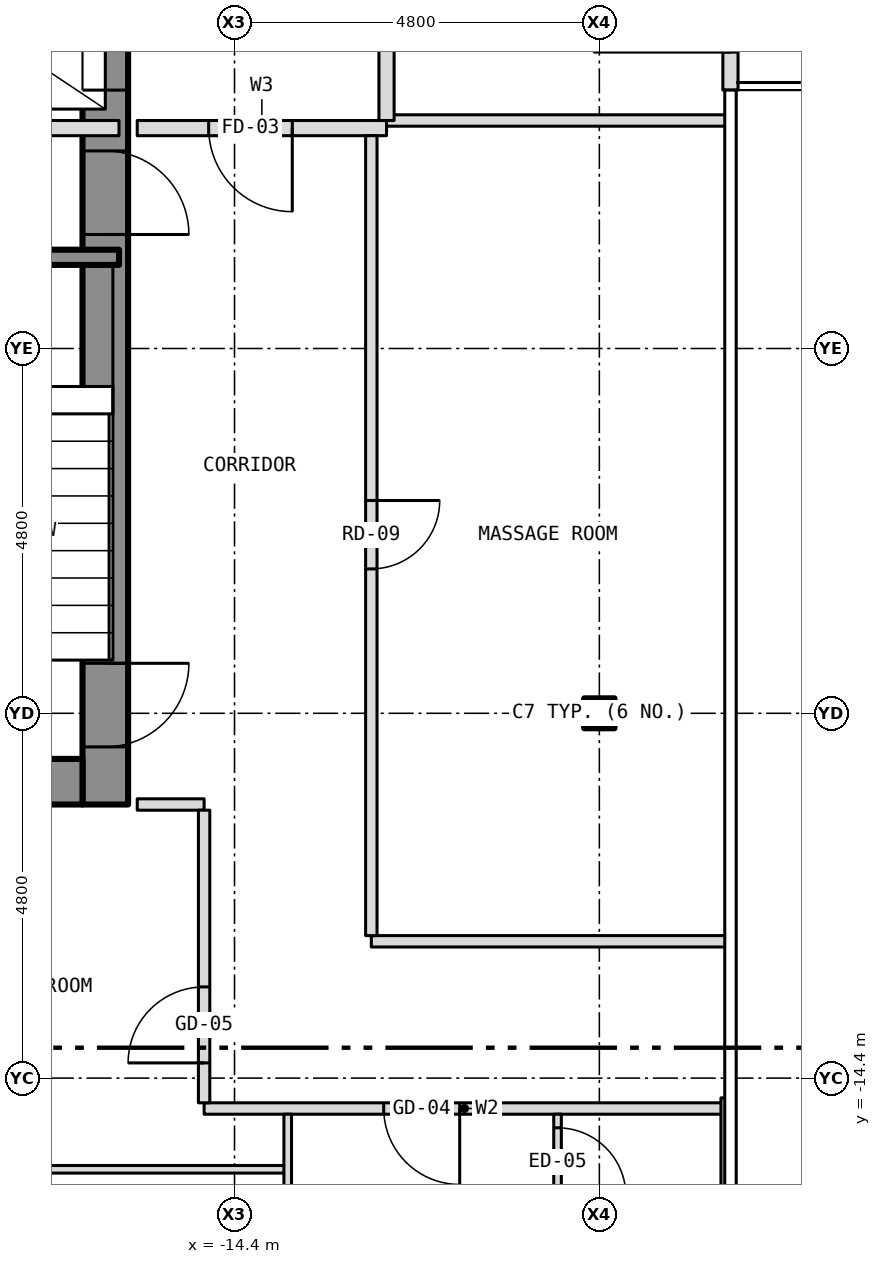
"""IFC4 building model, lengths in metres.
Left out: names, types, materials, properties, quantities, classifications, styles, units other than length and angle.
Written with IfcOpenShell. Run it as: python <this file> out.ifc"""

import sys

from ifc_helpers import new_model, si_unit, direction, frame, frame_2d, origin, origin_2d, place, context, subcontext, project, spatial, rectangle, i_section, extrude, element, fill, save


model = new_model("IFC4")
c1 = context("Model", 3, precision=1e-05, world=origin(), true_north=direction((0.0, 1.0)))
c2 = subcontext(c1, "Body", "Model", "MODEL_VIEW")
j1 = project(units=[si_unit("LENGTHUNIT", "METRE"), si_unit("PLANEANGLEUNIT", "RADIAN")], contexts=[c1])
p1 = place(None, origin())
s1 = spatial("IfcSite", under=j1, at=p1, CompositionType="ELEMENT")
p2 = place(p1, origin())
s2 = spatial("IfcBuilding", under=s1, at=p2, CompositionType="ELEMENT")
p3 = place(p2, frame((0.0, 0.0, 120.5)))
s3 = spatial("IfcBuildingStorey", under=s2, at=p3, CompositionType="ELEMENT", Elevation=120.5)
p4 = place(p3, frame((-9.6, -9.6, -0.15), z_axis=(0.0, 0.0, 1.0), x_axis=(1.0, 0.0, 0.0)))
e1 = element("IfcColumn", 1, at=p4, inside=s3, PredefinedType="COLUMN", context=c2, shape_type="SweptSolid", body=[
    extrude(i_section(OverallWidth=0.399, OverallDepth=0.394, WebThickness=0.023, FlangeThickness=0.037, at=origin_2d()), origin(), (0.0, 0.0, 1.0), 3.5),
])
p5 = place(p3, frame((-16.1, -10.8, 0.0), z_axis=(0.0, 0.0, 1.0), x_axis=(0.0, 1.0, 0.0)))
e2 = element("IfcWall", 2, at=p5, inside=s3, PredefinedType="SHEAR", context=c2, shape_type="SweptSolid", body=[
    extrude(rectangle(XDim=21.6, YDim=0.6, at=frame_2d((10.8, 0.0))), origin(), (0.0, 0.0, 1.0), 3.25),
])
p6 = place(p5, frame((9.4, 0.0, 0.0)))
e3 = element("IfcOpeningElement", 3, at=p6, cuts=e2, PredefinedType="OPENING", context=c2, shape_type="SweptSolid", body=[
    extrude(rectangle(XDim=1.1, YDim=2.1, at=frame_2d((0.55, 1.05))), frame((0.0, 0.312, 0.0), z_axis=(0.0, -1.0, 0.0), x_axis=(1.0, 0.0, 0.0)), (0.0, 0.0, 1.0), 0.624),
])
p7 = place(p5, frame((11.5, 0.0, 0.0)))
e4 = element("IfcOpeningElement", 4, at=p7, cuts=e2, PredefinedType="OPENING", context=c2, shape_type="SweptSolid", body=[
    extrude(rectangle(XDim=1.1, YDim=2.1, at=frame_2d((0.55, 1.05))), frame((0.0, 0.312, 0.0), z_axis=(0.0, -1.0, 0.0), x_axis=(1.0, 0.0, 0.0)), (0.0, 0.0, 1.0), 0.624),
])
p8 = place(p5, frame((13.6, 0.0, 0.0)))
e5 = element("IfcOpeningElement", 5, at=p8, cuts=e2, PredefinedType="OPENING", context=c2, shape_type="SweptSolid", body=[
    extrude(rectangle(XDim=1.1, YDim=2.1, at=frame_2d((0.55, 1.05))), frame((0.0, 0.312, 0.0), z_axis=(0.0, -1.0, 0.0), x_axis=(1.0, 0.0, 0.0)), (0.0, 0.0, 1.0), 0.624),
])
p9 = place(p5, frame((15.7, 0.0, 0.0)))
e6 = element("IfcOpeningElement", 6, at=p9, cuts=e2, PredefinedType="OPENING", context=c2, shape_type="SweptSolid", body=[
    extrude(rectangle(XDim=1.1, YDim=2.1, at=frame_2d((0.55, 1.05))), frame((0.0, 0.312, 0.0), z_axis=(0.0, -1.0, 0.0), x_axis=(1.0, 0.0, 0.0)), (0.0, 0.0, 1.0), 0.624),
])
p10 = place(p5, frame((17.8, 0.0, 0.0)))
e7 = element("IfcOpeningElement", 7, at=p10, cuts=e2, PredefinedType="OPENING", context=c2, shape_type="SweptSolid", body=[
    extrude(rectangle(XDim=1.1, YDim=2.1, at=frame_2d((0.55, 1.05))), frame((0.0, 0.312, 0.0), z_axis=(0.0, -1.0, 0.0), x_axis=(1.0, 0.0, 0.0)), (0.0, 0.0, 1.0), 0.624),
])
p11 = place(p5, frame((0.758, 0.0, 0.0)))
e8 = element("IfcOpeningElement", 8, at=p11, cuts=e2, PredefinedType="OPENING", context=c2, shape_type="SweptSolid", body=[
    extrude(rectangle(XDim=1.1, YDim=2.1, at=frame_2d((0.55, 1.05))), frame((0.0, 0.312, 0.0), z_axis=(0.0, -1.0, 0.0), x_axis=(1.0, 0.0, 0.0)), (0.0, 0.0, 1.0), 0.624),
])
p12 = place(p5, frame((7.5, 0.0, 0.0)))
e9 = element("IfcOpeningElement", 9, at=p12, cuts=e2, PredefinedType="OPENING", context=c2, shape_type="SweptSolid", body=[
    extrude(rectangle(XDim=1.1, YDim=2.1, at=frame_2d((0.55, 1.05))), frame((0.0, 0.312, 0.0), z_axis=(0.0, -1.0, 0.0), x_axis=(1.0, 0.0, 0.0)), (0.0, 0.0, 1.0), 0.624),
])
p13 = place(p3, frame((-22.2, -10.5, 0.0), z_axis=(0.0, 0.0, 1.0), x_axis=(1.0, 0.0, 0.0)))
e10 = element("IfcWall", 10, at=p13, inside=s3, PredefinedType="SHEAR", context=c2, shape_type="SweptSolid", body=[
    extrude(rectangle(XDim=5.8, YDim=0.6, at=frame_2d((2.9, 0.0))), origin(), (0.0, 0.0, 1.0), 3.25),
])
p14 = place(p3, frame((-7.875, -1.4, 0.0), z_axis=(0.0, 0.0, 1.0), x_axis=(0.0, 1.0, 0.0)))
e11 = element("IfcWall", 11, at=p14, inside=s3, PredefinedType="SOLIDWALL", context=c2, shape_type="SweptSolid", body=[
    extrude(rectangle(XDim=2.8, YDim=0.2, at=frame_2d((1.4, 0.0))), origin(), (0.0, 0.0, 1.0), 3.5),
])
p15 = place(p14, frame((0.5, 0.0, 0.0)))
e12 = element("IfcOpeningElement", 12, at=p15, cuts=e11, PredefinedType="OPENING", context=c2, shape_type="SweptSolid", body=[
    extrude(rectangle(XDim=1.8, YDim=2.1, at=frame_2d((0.9, 1.05))), frame((0.0, 0.112, 0.0), z_axis=(0.0, -1.0, 0.0), x_axis=(1.0, 0.0, 0.0)), (0.0, 0.0, 1.0), 0.224),
])
p16 = place(p3, frame((-23.28, -15.6, 0.0), z_axis=(0.0, 0.0, 1.0), x_axis=(1.0, 0.0, 0.0)))
e13 = element("IfcWall", 13, at=p16, inside=s3, PredefinedType="PARTITIONING", context=c2, shape_type="SweptSolid", body=[
    extrude(rectangle(XDim=9.58, YDim=0.1, at=frame_2d((4.79, 0.0))), origin(), (0.0, 0.0, 1.0), 3.35),
])
p17 = place(p16, frame((4.568, 0.0, 0.0)))
e14 = element("IfcOpeningElement", 14, at=p17, cuts=e13, PredefinedType="OPENING", context=c2, shape_type="SweptSolid", body=[
    extrude(rectangle(XDim=0.9, YDim=2.1, at=frame_2d((0.45, 1.05))), frame((0.0, 0.062, 0.0), z_axis=(0.0, -1.0, 0.0), x_axis=(1.0, 0.0, 0.0)), (0.0, 0.0, 1.0), 0.124),
])
p18 = place(p3, frame((-14.8, -14.8, 0.0), z_axis=(0.0, 0.0, 1.0), x_axis=(1.0, 0.0, 0.0)))
e15 = element("IfcWall", 15, at=p18, inside=s3, PredefinedType="PARTITIONING", context=c2, shape_type="SweptSolid", body=[
    extrude(rectangle(XDim=6.85, YDim=0.15, at=frame_2d((3.425, 0.0))), origin(), (0.0, 0.0, 1.0), 3.35),
])
p19 = place(p18, frame((2.363, 0.0, 0.0)))
e16 = element("IfcOpeningElement", 16, at=p19, cuts=e15, PredefinedType="OPENING", context=c2, shape_type="SweptSolid", body=[
    extrude(rectangle(XDim=1.0, YDim=2.1, at=frame_2d((0.5, 1.05))), frame((0.0, 0.087, 0.0), z_axis=(0.0, -1.0, 0.0), x_axis=(1.0, 0.0, 0.0)), (0.0, 0.0, 1.0), 0.174),
])
p20 = place(p3, frame((-12.6, -12.6, 0.0), z_axis=(0.0, 0.0, 1.0), x_axis=(1.0, 0.0, 0.0)))
e17 = element("IfcWall", 17, at=p20, inside=s3, PredefinedType="PARTITIONING", context=c2, shape_type="SweptSolid", body=[
    extrude(rectangle(XDim=4.68, YDim=0.15, at=frame_2d((2.34, 0.0))), origin(), (0.0, 0.0, 1.0), 3.35),
])
p21 = place(p3, frame((-15.68, -10.8, 0.0), z_axis=(0.0, 0.0, 1.0), x_axis=(1.0, 0.0, 0.0)))
e18 = element("IfcWall", 18, at=p21, inside=s3, PredefinedType="PARTITIONING", context=c2, shape_type="SweptSolid", body=[
    extrude(rectangle(XDim=0.88, YDim=0.15, at=frame_2d((0.44, 0.0))), origin(), (0.0, 0.0, 1.0), 3.35),
])
p22 = place(p3, frame((-20.0, -3.6, 0.0), z_axis=(0.0, 0.0, 1.0), x_axis=(1.0, 0.0, 0.0)))
e19 = element("IfcWall", 19, at=p22, inside=s3, PredefinedType="SHEAR", context=c2, shape_type="SweptSolid", body=[
    extrude(rectangle(XDim=4.08, YDim=0.2, at=frame_2d((2.04, 0.0))), origin(), (0.0, 0.0, 1.0), 3.25),
])
p23 = place(p3, frame((-22.68, -1.9, 0.0), z_axis=(0.0, 0.0, 1.0), x_axis=(1.0, 0.0, 0.0)))
e20 = element("IfcWall", 20, at=p23, inside=s3, PredefinedType="PARTITIONING", context=c2, shape_type="SweptSolid", body=[
    extrude(rectangle(XDim=6.76, YDim=0.2, at=frame_2d((3.38, 0.0))), origin(), (0.0, 0.0, 1.0), 3.25),
])
p24 = place(p3, frame((-15.68, -1.9, 0.0), z_axis=(0.0, 0.0, 1.0), x_axis=(1.0, 0.0, 0.0)))
e21 = element("IfcWall", 21, at=p24, inside=s3, PredefinedType="PARTITIONING", context=c2, shape_type="SweptSolid", body=[
    extrude(rectangle(XDim=3.28, YDim=0.2, at=frame_2d((1.64, 0.0))), origin(), (0.0, 0.0, 1.0), 3.35),
])
p25 = place(p24, frame((0.94, 0.0, 0.0)))
e22 = element("IfcOpeningElement", 22, at=p25, cuts=e21, PredefinedType="OPENING", context=c2, shape_type="SweptSolid", body=[
    extrude(rectangle(XDim=1.1, YDim=2.1, at=frame_2d((0.55, 1.05))), frame((0.0, 0.112, 0.0), z_axis=(0.0, -1.0, 0.0), x_axis=(1.0, 0.0, 0.0)), (0.0, 0.0, 1.0), 0.224),
])
p26 = place(p3, frame((-12.4, -1.8, 0.0), z_axis=(0.0, 0.0, 1.0), x_axis=(1.0, 0.0, 0.0)))
e23 = element("IfcWall", 23, at=p26, inside=s3, PredefinedType="PARTITIONING", context=c2, shape_type="SweptSolid", body=[
    extrude(rectangle(XDim=4.48, YDim=0.15, at=frame_2d((2.24, 0.0))), origin(), (0.0, 0.0, 1.0), 3.35),
])
p27 = place(p3, frame((-14.8, -14.725, 0.0), z_axis=(0.0, 0.0, 1.0), x_axis=(0.0, 1.0, 0.0)))
e24 = element("IfcWall", 24, at=p27, inside=s3, PredefinedType="PARTITIONING", context=c2, shape_type="SweptSolid", body=[
    extrude(rectangle(XDim=3.85, YDim=0.15, at=frame_2d((1.925, 0.0))), origin(), (0.0, 0.0, 1.0), 3.35),
])
p28 = place(p27, frame((0.525, 0.0, 0.0)))
e25 = element("IfcOpeningElement", 25, at=p28, cuts=e24, PredefinedType="OPENING", context=c2, shape_type="SweptSolid", body=[
    extrude(rectangle(XDim=1.0, YDim=2.1, at=frame_2d((0.5, 1.05))), frame((0.0, 0.087, 0.0), z_axis=(0.0, -1.0, 0.0), x_axis=(1.0, 0.0, 0.0)), (0.0, 0.0, 1.0), 0.174),
])
p29 = place(p3, frame((-13.7, -22.68, 0.0), z_axis=(0.0, 0.0, 1.0), x_axis=(0.0, 1.0, 0.0)))
e26 = element("IfcWall", 26, at=p29, inside=s3, PredefinedType="PARTITIONING", context=c2, shape_type="SweptSolid", body=[
    extrude(rectangle(XDim=7.805, YDim=0.1, at=frame_2d((3.902, 0.0))), origin(), (0.0, 0.0, 1.0), 3.35),
])
p30 = place(p3, frame((-12.6, -12.525, 0.0), z_axis=(0.0, 0.0, 1.0), x_axis=(0.0, 1.0, 0.0)))
e27 = element("IfcWall", 27, at=p30, inside=s3, PredefinedType="PARTITIONING", context=c2, shape_type="SweptSolid", body=[
    extrude(rectangle(XDim=10.525, YDim=0.15, at=frame_2d((5.262, 0.0))), origin(), (0.0, 0.0, 1.0), 3.35),
])
p31 = place(p30, frame((4.825, 0.0, 0.0)))
e28 = element("IfcOpeningElement", 28, at=p31, cuts=e27, PredefinedType="OPENING", context=c2, shape_type="SweptSolid", body=[
    extrude(rectangle(XDim=0.9, YDim=2.1, at=frame_2d((0.45, 1.05))), frame((0.0, 0.087, 0.0), z_axis=(0.0, -1.0, 0.0), x_axis=(1.0, 0.0, 0.0)), (0.0, 0.0, 1.0), 0.174),
])
p32 = place(p3, frame((-12.4, -1.8, 0.0), z_axis=(0.0, 0.0, 1.0), x_axis=(0.0, 1.0, 0.0)))
e29 = element("IfcWall", 29, at=p32, inside=s3, PredefinedType="PARTITIONING", context=c2, shape_type="SweptSolid", body=[
    extrude(rectangle(XDim=4.0, YDim=0.2, at=frame_2d((2.0, 0.0))), origin(), (0.0, 0.0, 1.0), 3.35),
])
p33 = place(p32, frame((1.25, 0.0, 0.0)))
e30 = element("IfcOpeningElement", 30, at=p33, cuts=e29, PredefinedType="OPENING", context=c2, shape_type="SweptSolid", body=[
    extrude(rectangle(XDim=1.1, YDim=2.1, at=frame_2d((0.55, 1.05))), frame((0.0, 0.112, 0.0), z_axis=(0.0, -1.0, 0.0), x_axis=(1.0, 0.0, 0.0)), (0.0, 0.0, 1.0), 0.224),
])
p34 = place(p3, frame((-10.15, -17.95, 0.0), z_axis=(0.0, 0.0, 1.0), x_axis=(0.0, 1.0, 0.0)))
e31 = element("IfcWall", 31, at=p34, inside=s3, PredefinedType="PARTITIONING", context=c2, shape_type="SweptSolid", body=[
    extrude(rectangle(XDim=3.075, YDim=0.1, at=frame_2d((1.538, 0.0))), origin(), (0.0, 0.0, 1.0), 3.35),
])
p35 = place(p34, frame((1.996, 0.0, 0.0)))
e32 = element("IfcOpeningElement", 32, at=p35, cuts=e31, PredefinedType="OPENING", context=c2, shape_type="SweptSolid", body=[
    extrude(rectangle(XDim=0.9, YDim=2.1, at=frame_2d((0.45, 1.05))), frame((0.0, 0.062, 0.0), z_axis=(0.0, -1.0, 0.0), x_axis=(1.0, 0.0, 0.0)), (0.0, 0.0, 1.0), 0.124),
])
p36 = place(p3, frame((-7.95, -18.14, 0.0), z_axis=(0.0, 0.0, 1.0), x_axis=(0.0, 1.0, 0.0)))
e33 = element("IfcWall", 33, at=p36, inside=s3, PredefinedType="PARTITIONING", context=c2, shape_type="SweptSolid", body=[
    extrude(rectangle(XDim=3.48, YDim=0.1, at=frame_2d((1.74, 0.0))), origin(), (0.0, 0.0, 1.0), 2.733),
])
p37 = place(p15, origin())
e34 = element("IfcDoor", 34, at=p37, inside=s3, OperationType="DOUBLE_DOOR_DOUBLE_SWING", PredefinedType="DOOR", context=c2, shape_type="SweptSolid", body=[
    extrude(rectangle(XDim=1.8, YDim=2.1, at=frame_2d((0.9, 1.05))), frame((0.0, 0.025, 0.0), z_axis=(0.0, -1.0, 0.0), x_axis=(1.0, 0.0, 0.0)), (0.0, 0.0, 1.0), 0.05),
])
fill(e12, e34)
p38 = place(p6, origin())
e35 = element("IfcDoor", 35, at=p38, inside=s3, OperationType="SLIDING_TO_LEFT", PredefinedType="DOOR", context=c2, shape_type="SweptSolid", body=[
    extrude(rectangle(XDim=1.1, YDim=2.1, at=frame_2d((0.55, 1.05))), frame((0.0, 0.025, 0.0), z_axis=(0.0, -1.0, 0.0), x_axis=(1.0, 0.0, 0.0)), (0.0, 0.0, 1.0), 0.05),
])
fill(e3, e35)
p39 = place(p11, origin())
e36 = element("IfcDoor", 36, at=p39, inside=s3, OperationType="SINGLE_SWING_RIGHT", PredefinedType="DOOR", context=c2, shape_type="SweptSolid", body=[
    extrude(rectangle(XDim=1.1, YDim=2.1, at=frame_2d((0.55, 1.05))), frame((0.0, 0.025, 0.0), z_axis=(0.0, -1.0, 0.0), x_axis=(1.0, 0.0, 0.0)), (0.0, 0.0, 1.0), 0.05),
])
fill(e8, e36)
p40 = place(p12, origin())
e37 = element("IfcDoor", 37, at=p40, inside=s3, OperationType="SINGLE_SWING_LEFT", PredefinedType="DOOR", context=c2, shape_type="SweptSolid", body=[
    extrude(rectangle(XDim=1.1, YDim=2.1, at=frame_2d((0.55, 1.05))), frame((0.0, 0.025, 0.0), z_axis=(0.0, -1.0, 0.0), x_axis=(1.0, 0.0, 0.0)), (0.0, 0.0, 1.0), 0.05),
])
fill(e9, e37)
p41 = place(p25, origin())
e38 = element("IfcDoor", 38, at=p41, inside=s3, OperationType="SINGLE_SWING_RIGHT", PredefinedType="DOOR", context=c2, shape_type="SweptSolid", body=[
    extrude(rectangle(XDim=1.1, YDim=2.1, at=frame_2d((0.55, 1.05))), frame((0.0, 0.025, 0.0), z_axis=(0.0, -1.0, 0.0), x_axis=(1.0, 0.0, 0.0)), (0.0, 0.0, 1.0), 0.05),
])
fill(e22, e38)
p42 = place(p19, origin())
e39 = element("IfcDoor", 39, at=p42, inside=s3, OperationType="SINGLE_SWING_RIGHT", PredefinedType="DOOR", context=c2, shape_type="SweptSolid", body=[
    extrude(rectangle(XDim=1.0, YDim=2.1, at=frame_2d((0.5, 1.05))), frame((0.0, 0.025, 0.0), z_axis=(0.0, -1.0, 0.0), x_axis=(1.0, 0.0, 0.0)), (0.0, 0.0, 1.0), 0.05),
])
fill(e16, e39)
p43 = place(p35, origin())
e40 = element("IfcDoor", 40, at=p43, inside=s3, OperationType="SINGLE_SWING_LEFT", PredefinedType="DOOR", context=c2, shape_type="SweptSolid", body=[
    extrude(rectangle(XDim=0.9, YDim=2.1, at=frame_2d((0.45, 1.05))), frame((0.0, 0.025, 0.0), z_axis=(0.0, -1.0, 0.0), x_axis=(1.0, 0.0, 0.0)), (0.0, 0.0, 1.0), 0.05),
])
fill(e32, e40)
p44 = place(p28, origin())
e41 = element("IfcDoor", 41, at=p44, inside=s3, OperationType="SINGLE_SWING_LEFT", PredefinedType="DOOR", context=c2, shape_type="SweptSolid", body=[
    extrude(rectangle(XDim=1.0, YDim=2.1, at=frame_2d((0.5, 1.05))), frame((0.0, 0.025, 0.0), z_axis=(0.0, -1.0, 0.0), x_axis=(1.0, 0.0, 0.0)), (0.0, 0.0, 1.0), 0.05),
])
fill(e25, e41)
p45 = place(p31, origin())
e42 = element("IfcDoor", 42, at=p45, inside=s3, OperationType="SINGLE_SWING_RIGHT", PredefinedType="DOOR", context=c2, shape_type="SweptSolid", body=[
    extrude(rectangle(XDim=0.9, YDim=2.1, at=frame_2d((0.45, 1.05))), frame((0.0, 0.025, 0.0), z_axis=(0.0, -1.0, 0.0), x_axis=(1.0, 0.0, 0.0)), (0.0, 0.0, 1.0), 0.05),
])
fill(e28, e42)
save(model, sys.argv[1])
